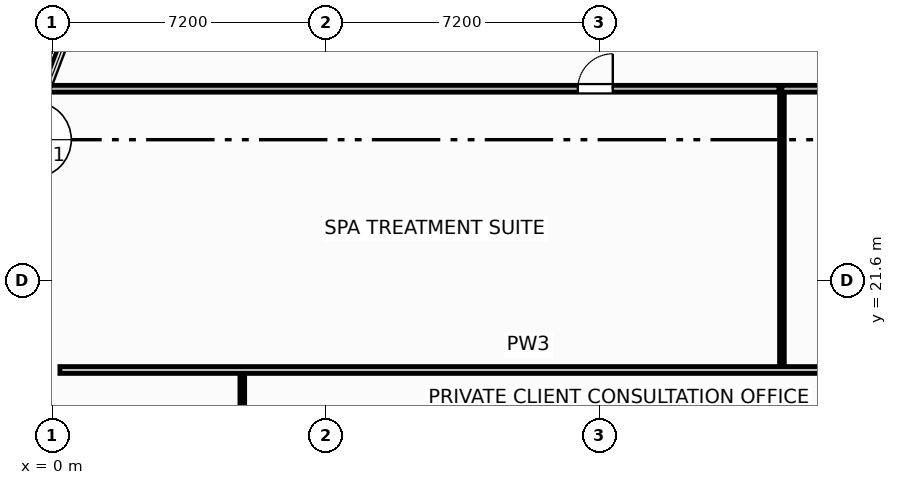
"""IFC4 building model, lengths in metres.
Left out: names, types, materials, properties, quantities, classifications, styles, units other than length and angle.
Written with IfcOpenShell. Run it as: python <this file> out.ifc"""

import sys

from ifc_helpers import new_model, si_unit, direction, frame, frame_2d, origin, place, context, subcontext, project, spatial, rectangle, extrude, element, fill, save


model = new_model("IFC4")
c1 = context("Model", 3, precision=1e-05, world=origin(), true_north=direction((0.0, 1.0)))
c2 = subcontext(c1, "Body", "Model", "MODEL_VIEW")
j1 = project(units=[si_unit("LENGTHUNIT", "METRE"), si_unit("PLANEANGLEUNIT", "RADIAN")], contexts=[c1])
p1 = place(None, origin())
s1 = spatial("IfcSite", under=j1, at=p1, CompositionType="ELEMENT")
p2 = place(p1, origin())
s2 = spatial("IfcBuilding", under=s1, at=p2, CompositionType="ELEMENT")
p3 = place(p2, frame((0.0, 0.0, 94.7)))
s3 = spatial("IfcBuildingStorey", under=s2, at=p3, CompositionType="ELEMENT", Elevation=94.7)
p4 = place(p3, frame((5.0, 16.61, 0.0), z_axis=(0.0, 0.0, 1.0), x_axis=(0.0, 1.0, 0.0)))
e1 = element("IfcWall", 1, at=p4, inside=s3, PredefinedType="PARTITIONING", context=c2, shape_type="SweptSolid", body=[
    extrude(rectangle(XDim=2.63, YDim=0.125, at=frame_2d((1.315, 0.0))), origin(), (0.0, 0.0, 1.0), 3.45),
])
p5 = place(p3, frame((-0.094, 26.64, 0.0), z_axis=(0.0, 0.0, 1.0), x_axis=(1.0, 0.0, 0.0)))
e2 = element("IfcWall", 2, at=p5, inside=s3, PredefinedType="PARTITIONING", context=c2, shape_type="SweptSolid", body=[
    extrude(rectangle(XDim=19.214, YDim=0.18, at=frame_2d((9.607, 0.0))), origin(), (0.0, 0.0, 1.0), 3.45),
])
p6 = place(p5, frame((13.923, 0.0, 0.0)))
e3 = element("IfcOpeningElement", 3, at=p6, cuts=e2, PredefinedType="OPENING", context=c2, shape_type="SweptSolid", body=[
    extrude(rectangle(XDim=0.92, YDim=2.05, at=frame_2d((0.46, 1.025))), frame((0.0, 0.1, 0.0), z_axis=(0.0, -1.0, 0.0), x_axis=(1.0, 0.0, 0.0)), (0.0, 0.0, 1.0), 0.2),
])
p7 = place(p3, frame((19.2, 19.24, 0.0), z_axis=(0.0, 0.0, 1.0), x_axis=(0.0, 1.0, 0.0)))
e4 = element("IfcWall", 4, at=p7, inside=s3, PredefinedType="PARTITIONING", context=c2, shape_type="SweptSolid", body=[
    extrude(rectangle(XDim=7.42, YDim=0.125, at=frame_2d((3.71, 0.0))), origin(), (0.0, 0.0, 1.0), 3.45),
])
p8 = place(p3, frame((0.2, 19.24, 0.0), z_axis=(0.0, 0.0, 1.0), x_axis=(1.0, 0.0, 0.0)))
e5 = element("IfcWall", 5, at=p8, inside=s3, PredefinedType="PARTITIONING", context=c2, shape_type="SweptSolid", body=[
    extrude(rectangle(XDim=24.65, YDim=0.18, at=frame_2d((12.325, 0.0))), origin(), (0.0, 0.0, 1.0), 3.45),
])
p9 = place(p3, frame((19.2, 26.64, 0.0), z_axis=(0.0, 0.0, 1.0), x_axis=(1.0, 0.0, 0.0)))
e6 = element("IfcWall", 6, at=p9, inside=s3, PredefinedType="PARTITIONING", context=c2, shape_type="SweptSolid", body=[
    extrude(rectangle(XDim=5.65, YDim=0.18, at=frame_2d((2.825, 0.0))), origin(), (0.0, 0.0, 1.0), 2.662),
])
p10 = place(p6, origin())
e7 = element("IfcDoor", 7, at=p10, inside=s3, OperationType="SINGLE_SWING_RIGHT", PredefinedType="DOOR", context=c2, shape_type="SweptSolid", body=[
    extrude(rectangle(XDim=0.92, YDim=2.05, at=frame_2d((0.46, 1.025))), frame((0.0, 0.025, 0.0), z_axis=(0.0, -1.0, 0.0), x_axis=(1.0, 0.0, 0.0)), (0.0, 0.0, 1.0), 0.05),
])
fill(e3, e7)
save(model, sys.argv[1])
